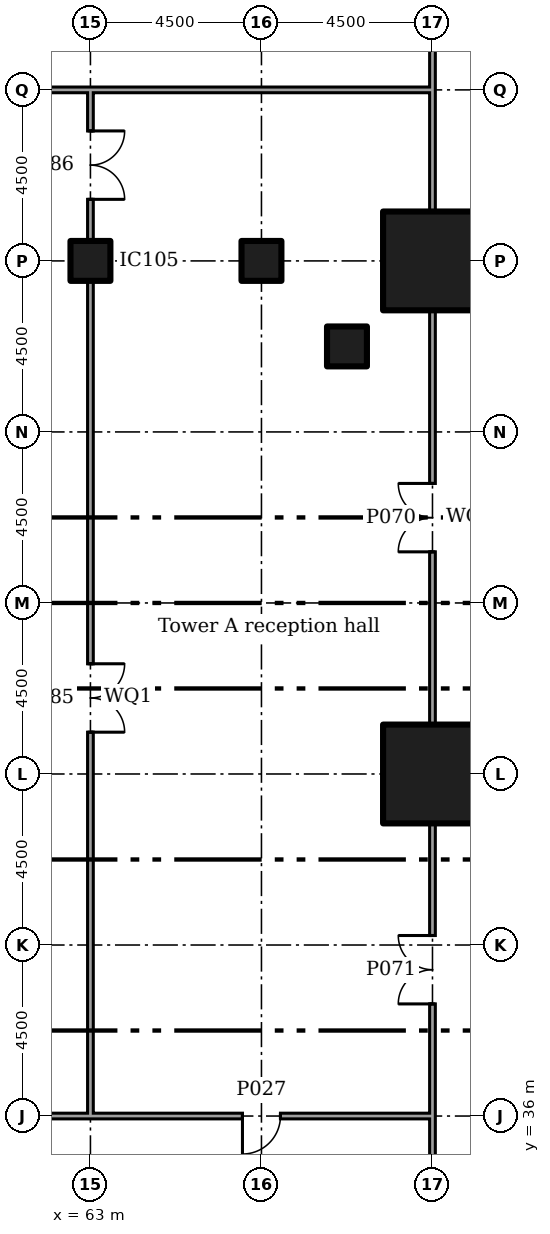
"""IFC4 building model, lengths in metres.
Left out: names, types, materials, properties, quantities, classifications, styles, units other than length and angle.
Written with IfcOpenShell. Run it as: python <this file> out.ifc"""

import sys

from ifc_helpers import new_model, si_unit, direction, frame, frame_2d, origin, origin_2d, place, context, subcontext, project, spatial, rectangle, extrude, element, fill, save


model = new_model("IFC4")
c1 = context("Model", 3, precision=1e-05, world=origin(), true_north=direction((0.0, 1.0)))
c2 = subcontext(c1, "Body", "Model", "MODEL_VIEW")
j1 = project(units=[si_unit("LENGTHUNIT", "METRE"), si_unit("PLANEANGLEUNIT", "RADIAN")], contexts=[c1])
p1 = place(None, origin())
s1 = spatial("IfcSite", under=j1, at=p1, CompositionType="ELEMENT")
p2 = place(p1, origin())
s2 = spatial("IfcBuilding", under=s1, at=p2, CompositionType="ELEMENT")
p3 = place(p2, origin())
s3 = spatial("IfcBuildingStorey", under=s2, at=p3, CompositionType="ELEMENT", Elevation=0.0)
for number, where in (
    (1, (72.0, 45.0, 0.0)),
    (2, (72.0, 58.5, 0.0)),
):
    element("IfcColumn", number, at=place(p3, frame(where)), inside=s3, PredefinedType="COLUMN", context=c2, shape_type="SweptSolid", body=[
        extrude(rectangle(XDim=2.6, YDim=2.6, at=origin_2d()), origin(), (0.0, 0.0, 1.0), 6.0),
    ])
for number, where in (
    (3, (63.0, 58.5, 0.0)),
    (4, (67.5, 58.5, 0.0)),
    (5, (69.75, 56.25, 0.0)),
):
    element("IfcColumn", number, at=place(p3, frame(where)), inside=s3, PredefinedType="COLUMN", context=c2, shape_type="SweptSolid", body=[
        extrude(rectangle(XDim=1.05, YDim=1.05, at=origin_2d()), origin(), (0.0, 0.0, 1.0), 6.0),
    ])
for number, where, z_axis, x_axis in (
    (6, (72.0, 32.795, 0.0), (0.0, 0.0, 1.0), (0.0, 1.0, 0.0)),
    (7, (72.0, 62.925, 0.0), (0.0, 0.0, 1.0), (0.0, 1.0, 0.0)),
):
    element("IfcWall", number, at=place(p3, frame(where, z_axis=z_axis, x_axis=x_axis)), inside=s3, PredefinedType="PARTITIONING", context=c2, shape_type="SweptSolid", body=[
        extrude(rectangle(XDim=3.28, YDim=0.15, at=frame_2d((1.64, 0.0))), origin(), (0.0, 0.0, 1.0), 5.55),
    ])
p4 = place(p3, frame((72.0, 36.0, 0.0), z_axis=(0.0, 0.0, 1.0), x_axis=(0.0, 1.0, 0.0)))
e8 = element("IfcWall", 8, at=p4, inside=s3, PredefinedType="PARTITIONING", context=c2, shape_type="SweptSolid", body=[
    extrude(rectangle(XDim=7.705, YDim=0.15, at=frame_2d((3.853, 0.0))), origin(), (0.0, 0.0, 1.0), 5.55),
])
p5 = place(p4, frame((2.95, 0.0, 0.0)))
e9 = element("IfcOpeningElement", 9, at=p5, cuts=e8, PredefinedType="OPENING", context=c2, shape_type="SweptSolid", body=[
    extrude(rectangle(XDim=1.8, YDim=2.1, at=frame_2d((0.9, 1.05))), frame((0.0, 0.085, 0.0), z_axis=(0.0, -1.0, 0.0), x_axis=(1.0, 0.0, 0.0)), (0.0, 0.0, 1.0), 0.17),
])
p6 = place(p3, frame((72.0, 46.295, 0.0), z_axis=(0.0, 0.0, 1.0), x_axis=(0.0, 1.0, 0.0)))
e10 = element("IfcWall", 10, at=p6, inside=s3, PredefinedType="PARTITIONING", context=c2, shape_type="SweptSolid", body=[
    extrude(rectangle(XDim=10.91, YDim=0.15, at=frame_2d((5.455, 0.0))), origin(), (0.0, 0.0, 1.0), 5.55),
])
p7 = place(p6, frame((4.55, 0.0, 0.0)))
e11 = element("IfcOpeningElement", 11, at=p7, cuts=e10, PredefinedType="OPENING", context=c2, shape_type="SweptSolid", body=[
    extrude(rectangle(XDim=1.8, YDim=2.1, at=frame_2d((0.9, 1.05))), frame((0.0, 0.085, 0.0), z_axis=(0.0, -1.0, 0.0), x_axis=(1.0, 0.0, 0.0)), (0.0, 0.0, 1.0), 0.17),
])
p8 = place(p3, frame((72.0, 59.795, 0.0), z_axis=(0.0, 0.0, 1.0), x_axis=(0.0, 1.0, 0.0)))
e12 = element("IfcWall", 12, at=p8, inside=s3, PredefinedType="PARTITIONING", context=c2, shape_type="SweptSolid", body=[
    extrude(rectangle(XDim=3.205, YDim=0.15, at=frame_2d((1.603, 0.0))), origin(), (0.0, 0.0, 1.0), 5.55),
])
p9 = place(p3, frame((62.925, 36.0, 0.0)))
e13 = element("IfcWall", 13, at=p9, inside=s3, PredefinedType="PARTITIONING", context=c2, shape_type="SweptSolid", body=[
    extrude(rectangle(XDim=9.0, YDim=0.15, at=frame_2d((4.5, 0.0))), origin(), (0.0, 0.0, 1.0), 5.55),
])
p10 = place(p9, frame((4.075, 0.0, 0.0)))
e14 = element("IfcOpeningElement", 14, at=p10, cuts=e13, PredefinedType="OPENING", context=c2, shape_type="SweptSolid", body=[
    extrude(rectangle(XDim=1.0, YDim=2.1, at=frame_2d((0.5, 1.05))), frame((0.0, 0.085, 0.0), z_axis=(0.0, -1.0, 0.0), x_axis=(1.0, 0.0, 0.0)), (0.0, 0.0, 1.0), 0.17),
])
p11 = place(p3, frame((59.02, 36.0, 0.0)))
e15 = element("IfcWall", 15, at=p11, inside=s3, PredefinedType="PARTITIONING", context=c2, shape_type="SweptSolid", body=[
    extrude(rectangle(XDim=3.98, YDim=0.15, at=frame_2d((1.99, 0.0))), origin(), (0.0, 0.0, 1.0), 5.55),
])
p12 = place(p3, frame((62.925, 63.0, 0.0)))
e16 = element("IfcWall", 16, at=p12, inside=s3, PredefinedType="PARTITIONING", context=c2, shape_type="SweptSolid", body=[
    extrude(rectangle(XDim=9.0, YDim=0.15, at=frame_2d((4.5, 0.0))), origin(), (0.0, 0.0, 1.0), 5.55),
])
p13 = place(p3, frame((45.0, 63.0, 0.0)))
e17 = element("IfcWall", 17, at=p13, inside=s3, PredefinedType="PARTITIONING", context=c2, shape_type="SweptSolid", body=[
    extrude(rectangle(XDim=18.0, YDim=0.15, at=frame_2d((9.0, 0.0))), origin(), (0.0, 0.0, 1.0), 5.55),
])
p14 = place(p13, frame((8.5, 0.0, 0.0)))
e18 = element("IfcOpeningElement", 18, at=p14, cuts=e17, PredefinedType="OPENING", context=c2, shape_type="SweptSolid", body=[
    extrude(rectangle(XDim=1.0, YDim=2.1, at=frame_2d((0.5, 1.05))), frame((0.0, 0.085, 0.0), z_axis=(0.0, -1.0, 0.0), x_axis=(1.0, 0.0, 0.0)), (0.0, 0.0, 1.0), 0.17),
])
p15 = place(p3, frame((63.0, 36.075, 0.0), z_axis=(0.0, 0.0, 1.0), x_axis=(0.0, 1.0, 0.0)))
e19 = element("IfcWall", 19, at=p15, inside=s3, PredefinedType="PARTITIONING", context=c2, shape_type="SweptSolid", body=[
    extrude(rectangle(XDim=21.905, YDim=0.15, at=frame_2d((10.953, 0.0))), origin(), (0.0, 0.0, 1.0), 5.55),
])
p16 = place(p15, frame((10.025, 0.0, 0.0)))
e20 = element("IfcOpeningElement", 20, at=p16, cuts=e19, PredefinedType="OPENING", context=c2, shape_type="SweptSolid", body=[
    extrude(rectangle(XDim=1.8, YDim=2.1, at=frame_2d((0.9, 1.05))), frame((0.0, 0.085, 0.0), z_axis=(0.0, -1.0, 0.0), x_axis=(1.0, 0.0, 0.0)), (0.0, 0.0, 1.0), 0.17),
])
p17 = place(p3, frame((63.0, 59.02, 0.0), z_axis=(0.0, 0.0, 1.0), x_axis=(0.0, 1.0, 0.0)))
e21 = element("IfcWall", 21, at=p17, inside=s3, PredefinedType="PARTITIONING", context=c2, shape_type="SweptSolid", body=[
    extrude(rectangle(XDim=3.905, YDim=0.15, at=frame_2d((1.953, 0.0))), origin(), (0.0, 0.0, 1.0), 5.55),
])
p18 = place(p17, frame((1.1, 0.0, 0.0)))
e22 = element("IfcOpeningElement", 22, at=p18, cuts=e21, PredefinedType="OPENING", context=c2, shape_type="SweptSolid", body=[
    extrude(rectangle(XDim=1.8, YDim=2.1, at=frame_2d((0.9, 1.05))), frame((0.0, 0.085, 0.0), z_axis=(0.0, -1.0, 0.0), x_axis=(1.0, 0.0, 0.0)), (0.0, 0.0, 1.0), 0.17),
])
p19 = place(p10, frame((1.0, 0.0, 0.0), x_axis=(-1.0, 0.0, 0.0)))
e23 = element("IfcDoor", 23, at=p19, inside=s3, OperationType="SINGLE_SWING_LEFT", PredefinedType="DOOR", context=c2, shape_type="SweptSolid", body=[
    extrude(rectangle(XDim=1.0, YDim=2.1, at=frame_2d((0.5, 1.05))), frame((0.0, 0.025, 0.0), z_axis=(0.0, -1.0, 0.0), x_axis=(1.0, 0.0, 0.0)), (0.0, 0.0, 1.0), 0.05),
])
fill(e14, e23)
p20 = place(p7, origin())
e24 = element("IfcDoor", 24, at=p20, inside=s3, OperationType="DOUBLE_DOOR_SINGLE_SWING", PredefinedType="DOOR", context=c2, shape_type="SweptSolid", body=[
    extrude(rectangle(XDim=1.8, YDim=2.1, at=frame_2d((0.9, 1.05))), frame((0.0, 0.025, 0.0), z_axis=(0.0, -1.0, 0.0), x_axis=(1.0, 0.0, 0.0)), (0.0, 0.0, 1.0), 0.05),
])
fill(e11, e24)
p21 = place(p5, origin())
e25 = element("IfcDoor", 25, at=p21, inside=s3, OperationType="DOUBLE_DOOR_SINGLE_SWING", PredefinedType="DOOR", context=c2, shape_type="SweptSolid", body=[
    extrude(rectangle(XDim=1.8, YDim=2.1, at=frame_2d((0.9, 1.05))), frame((0.0, 0.025, 0.0), z_axis=(0.0, -1.0, 0.0), x_axis=(1.0, 0.0, 0.0)), (0.0, 0.0, 1.0), 0.05),
])
fill(e9, e25)
p22 = place(p16, frame((1.8, 0.0, 0.0), x_axis=(-1.0, 0.0, 0.0)))
e26 = element("IfcDoor", 26, at=p22, inside=s3, OperationType="DOUBLE_DOOR_SINGLE_SWING", PredefinedType="DOOR", context=c2, shape_type="SweptSolid", body=[
    extrude(rectangle(XDim=1.8, YDim=2.1, at=frame_2d((0.9, 1.05))), frame((0.0, 0.025, 0.0), z_axis=(0.0, -1.0, 0.0), x_axis=(1.0, 0.0, 0.0)), (0.0, 0.0, 1.0), 0.05),
])
fill(e20, e26)
p23 = place(p18, frame((1.8, 0.0, 0.0), x_axis=(-1.0, 0.0, 0.0)))
e27 = element("IfcDoor", 27, at=p23, inside=s3, OperationType="DOUBLE_DOOR_SINGLE_SWING", PredefinedType="DOOR", context=c2, shape_type="SweptSolid", body=[
    extrude(rectangle(XDim=1.8, YDim=2.1, at=frame_2d((0.9, 1.05))), frame((0.0, 0.025, 0.0), z_axis=(0.0, -1.0, 0.0), x_axis=(1.0, 0.0, 0.0)), (0.0, 0.0, 1.0), 0.05),
])
fill(e22, e27)
save(model, sys.argv[1])
